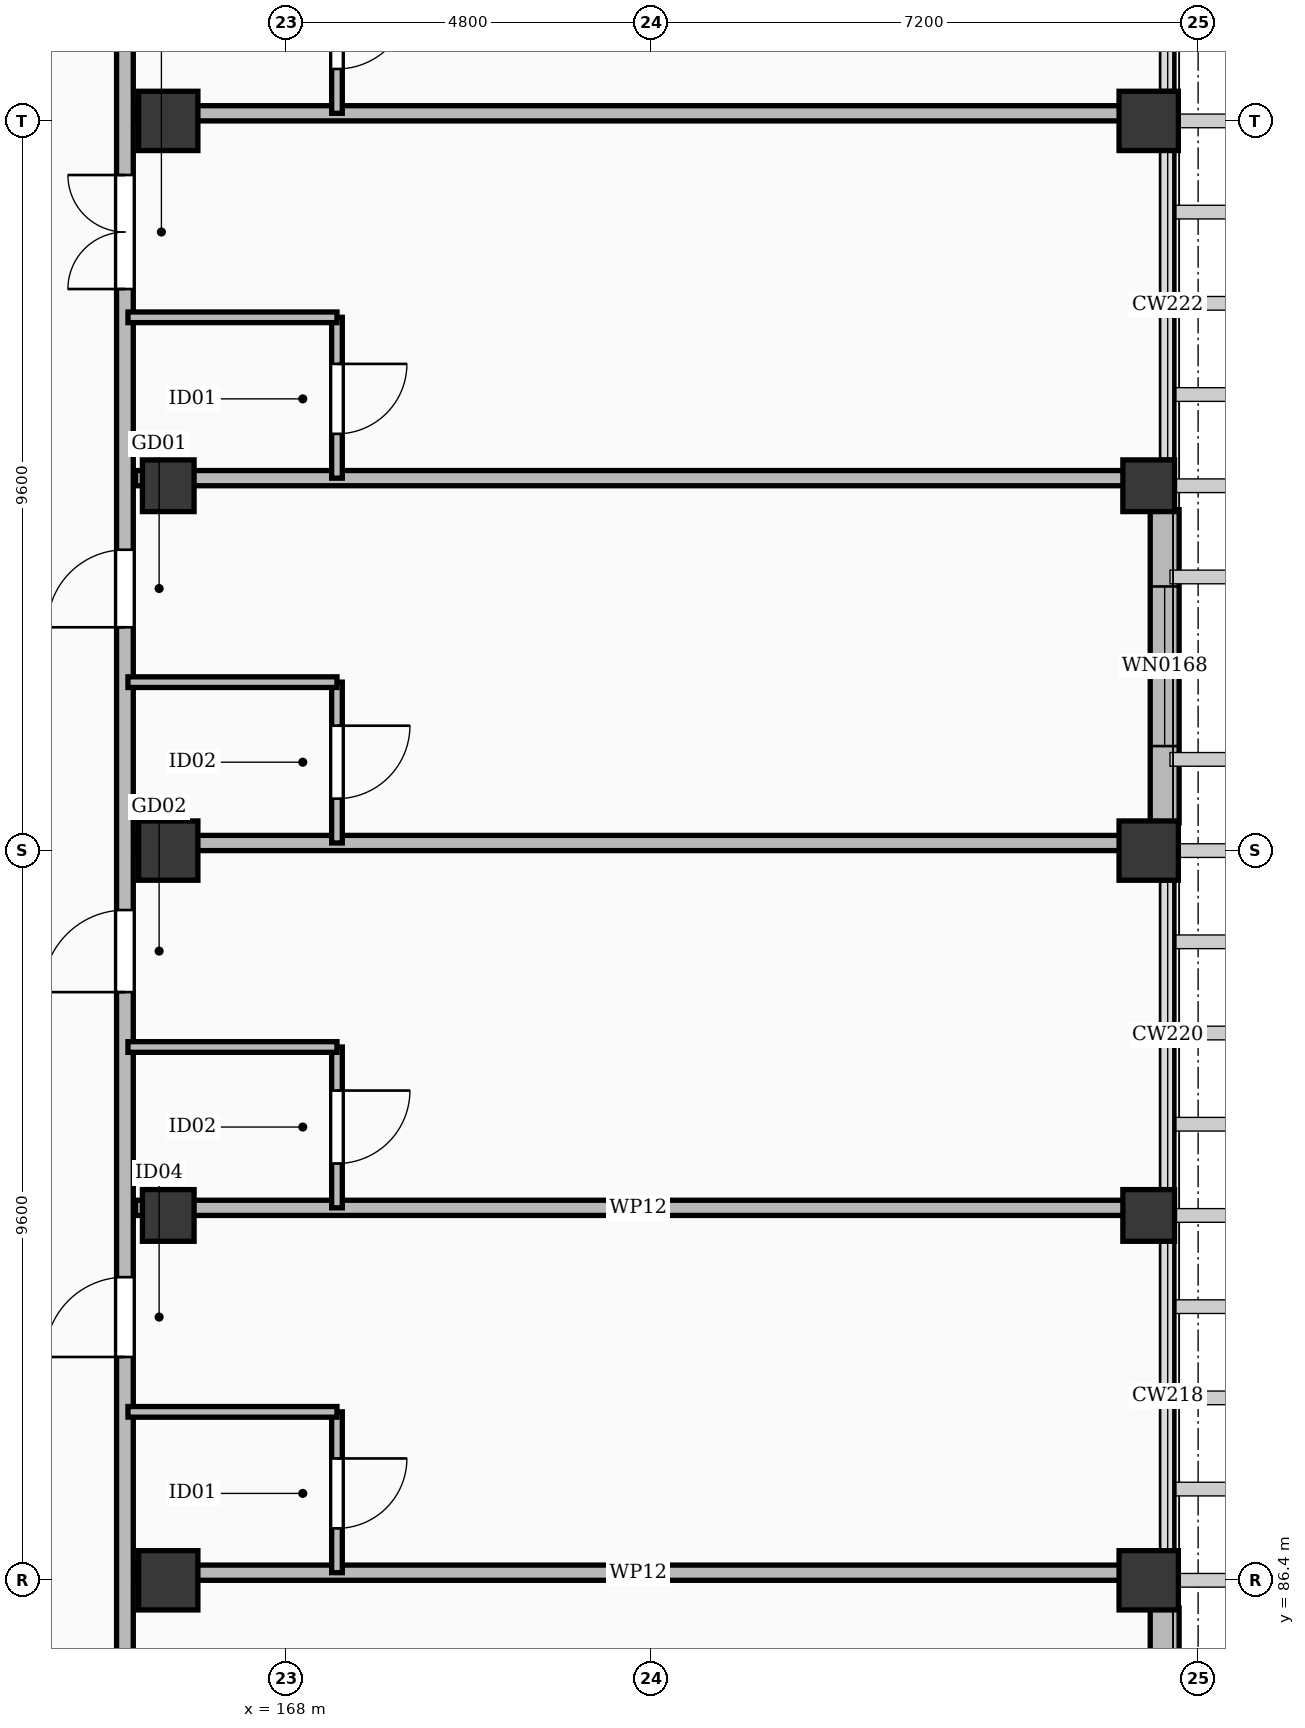
"""IFC4 building model, lengths in metres.
Left out: names, types, materials, properties, quantities, classifications, styles, units other than length and angle.
Written with IfcOpenShell. Run it as: python <this file> out.ifc"""

import sys

from ifc_helpers import new_model, si_unit, direction, frame, frame_2d, origin, origin_2d, place, context, subcontext, project, spatial, rectangle, extrude, element, fill, save


model = new_model("IFC4")
c1 = context("Model", 3, precision=1e-05, world=origin(), true_north=direction((0.0, 1.0)))
c2 = subcontext(c1, "Body", "Model", "MODEL_VIEW")
j1 = project(units=[si_unit("LENGTHUNIT", "METRE"), si_unit("PLANEANGLEUNIT", "RADIAN")], contexts=[c1])
p1 = place(None, origin())
s1 = spatial("IfcSite", under=j1, at=p1, CompositionType="ELEMENT")
p2 = place(p1, origin())
s2 = spatial("IfcBuilding", under=s1, at=p2, CompositionType="ELEMENT")
p3 = place(p2, frame((0.0, 0.0, 24.6)))
s3 = spatial("IfcBuildingStorey", under=s2, at=p3, CompositionType="ELEMENT", Elevation=24.6)
for number, where, z_axis, x_axis in (
    (1, (166.45, 86.4, 0.0), (0.0, 0.0, 1.0), (1.0, 0.0, 0.0)),
    (2, (166.45, 96.0, 0.0), (0.0, 0.0, 1.0), (1.0, 0.0, 0.0)),
    (3, (166.45, 105.6, 0.0), (0.0, 0.0, 1.0), (1.0, 0.0, 0.0)),
    (4, (179.35, 86.4, 0.0), (0.0, 0.0, 1.0), (1.0, 0.0, 0.0)),
    (5, (179.35, 96.0, 0.0), (0.0, 0.0, 1.0), (1.0, 0.0, 0.0)),
    (6, (179.35, 105.6, 0.0), (0.0, 0.0, 1.0), (1.0, 0.0, 0.0)),
):
    element("IfcColumn", number, at=place(p3, frame(where, z_axis=z_axis, x_axis=x_axis)), inside=s3, PredefinedType="COLUMN", context=c2, shape_type="SweptSolid", body=[
        extrude(rectangle(XDim=0.78, YDim=0.78, at=origin_2d()), origin(), (0.0, 0.0, 1.0), 3.6),
    ])
for number, where, z_axis, x_axis in (
    (7, (166.45, 91.2, 0.0), (0.0, 0.0, 1.0), (1.0, 0.0, 0.0)),
    (8, (166.45, 100.8, 0.0), (0.0, 0.0, 1.0), (1.0, 0.0, 0.0)),
    (9, (179.35, 91.2, 0.0), (0.0, 0.0, 1.0), (1.0, 0.0, 0.0)),
    (10, (179.35, 100.8, 0.0), (0.0, 0.0, 1.0), (1.0, 0.0, 0.0)),
):
    element("IfcColumn", number, at=place(p3, frame(where, z_axis=z_axis, x_axis=x_axis)), inside=s3, PredefinedType="COLUMN", context=c2, shape_type="SweptSolid", body=[
        extrude(rectangle(XDim=0.68, YDim=0.68, at=origin_2d()), origin(), (0.0, 0.0, 1.0), 3.6),
    ])
p4 = place(p3, frame((179.56, 86.035, 0.0), z_axis=(0.0, 0.0, 1.0), x_axis=(0.0, -1.0, 0.0)))
e11 = element("IfcWall", 11, at=p4, inside=s3, PredefinedType="SOLIDWALL", context=c2, shape_type="SweptSolid", body=[
    extrude(rectangle(XDim=4.12, YDim=0.38, at=frame_2d((2.06, 0.0))), origin(), (0.0, 0.0, 1.0), 2.582),
])
p5 = place(p4, frame((1.235, 0.0, 0.55)))
e12 = element("IfcOpeningElement", 12, at=p5, cuts=e11, PredefinedType="OPENING", context=c2, shape_type="SweptSolid", body=[
    extrude(rectangle(XDim=1.65, YDim=1.75, at=frame_2d((0.825, 0.875))), frame((0.0, 0.202, 0.0), z_axis=(0.0, -1.0, 0.0), x_axis=(1.0, 0.0, 0.0)), (0.0, 0.0, 1.0), 0.404),
])
p6 = place(p3, frame((179.56, 100.485, 0.0), z_axis=(0.0, 0.0, 1.0), x_axis=(0.0, -1.0, 0.0)))
e13 = element("IfcWall", 13, at=p6, inside=s3, PredefinedType="SOLIDWALL", context=c2, shape_type="SweptSolid", body=[
    extrude(rectangle(XDim=4.12, YDim=0.38, at=frame_2d((2.06, 0.0))), origin(), (0.0, 0.0, 1.0), 2.582),
])
p7 = place(p6, frame((1.01, 0.0, 0.55)))
e14 = element("IfcOpeningElement", 14, at=p7, cuts=e13, PredefinedType="OPENING", context=c2, shape_type="SweptSolid", body=[
    extrude(rectangle(XDim=2.1, YDim=1.78, at=frame_2d((1.05, 0.89))), frame((0.0, 0.202, 0.0), z_axis=(0.0, -1.0, 0.0), x_axis=(1.0, 0.0, 0.0)), (0.0, 0.0, 1.0), 0.404),
])
p8 = place(p3, frame((165.88, 65.4, 0.0), z_axis=(0.0, 0.0, 1.0), x_axis=(0.0, 1.0, 0.0)))
e15 = element("IfcWall", 15, at=p8, inside=s3, PredefinedType="PARTITIONING", context=c2, shape_type="SweptSolid", body=[
    extrude(rectangle(XDim=60.25, YDim=0.22, at=frame_2d((30.125, 0.0))), origin(), (0.0, 0.0, 1.0), 2.582),
])
p9 = place(p8, frame((4.738, 0.0, 0.0)))
e16 = element("IfcOpeningElement", 16, at=p9, cuts=e15, PredefinedType="OPENING", context=c2, shape_type="SweptSolid", body=[
    extrude(rectangle(XDim=1.02, YDim=2.2, at=frame_2d((0.51, 1.1))), frame((0.0, 0.122, 0.0), z_axis=(0.0, -1.0, 0.0), x_axis=(1.0, 0.0, 0.0)), (0.0, 0.0, 1.0), 0.244),
])
p10 = place(p8, frame((9.188, 0.0, 0.0)))
e17 = element("IfcOpeningElement", 17, at=p10, cuts=e15, PredefinedType="OPENING", context=c2, shape_type="SweptSolid", body=[
    extrude(rectangle(XDim=1.5, YDim=2.3, at=frame_2d((0.75, 1.15))), frame((0.0, 0.122, 0.0), z_axis=(0.0, -1.0, 0.0), x_axis=(1.0, 0.0, 0.0)), (0.0, 0.0, 1.0), 0.244),
])
p11 = place(p8, frame((14.338, 0.0, 0.0)))
e18 = element("IfcOpeningElement", 18, at=p11, cuts=e15, PredefinedType="OPENING", context=c2, shape_type="SweptSolid", body=[
    extrude(rectangle(XDim=1.12, YDim=2.15, at=frame_2d((0.56, 1.075))), frame((0.0, 0.122, 0.0), z_axis=(0.0, -1.0, 0.0), x_axis=(1.0, 0.0, 0.0)), (0.0, 0.0, 1.0), 0.244),
])
p12 = place(p8, frame((18.788, 0.0, 0.0)))
e19 = element("IfcOpeningElement", 19, at=p12, cuts=e15, PredefinedType="OPENING", context=c2, shape_type="SweptSolid", body=[
    extrude(rectangle(XDim=1.28, YDim=2.16, at=frame_2d((0.64, 1.08))), frame((0.0, 0.122, 0.0), z_axis=(0.0, -1.0, 0.0), x_axis=(1.0, 0.0, 0.0)), (0.0, 0.0, 1.0), 0.244),
])
p13 = place(p8, frame((23.938, 0.0, 0.0)))
e20 = element("IfcOpeningElement", 20, at=p13, cuts=e15, PredefinedType="OPENING", context=c2, shape_type="SweptSolid", body=[
    extrude(rectangle(XDim=1.05, YDim=2.18, at=frame_2d((0.525, 1.09))), frame((0.0, 0.122, 0.0), z_axis=(0.0, -1.0, 0.0), x_axis=(1.0, 0.0, 0.0)), (0.0, 0.0, 1.0), 0.244),
])
p14 = place(p8, frame((28.738, 0.0, 0.0)))
e21 = element("IfcOpeningElement", 21, at=p14, cuts=e15, PredefinedType="OPENING", context=c2, shape_type="SweptSolid", body=[
    extrude(rectangle(XDim=1.08, YDim=2.25, at=frame_2d((0.54, 1.125))), frame((0.0, 0.122, 0.0), z_axis=(0.0, -1.0, 0.0), x_axis=(1.0, 0.0, 0.0)), (0.0, 0.0, 1.0), 0.244),
])
p15 = place(p8, frame((33.538, 0.0, 0.0)))
e22 = element("IfcOpeningElement", 22, at=p15, cuts=e15, PredefinedType="OPENING", context=c2, shape_type="SweptSolid", body=[
    extrude(rectangle(XDim=1.02, YDim=2.2, at=frame_2d((0.51, 1.1))), frame((0.0, 0.122, 0.0), z_axis=(0.0, -1.0, 0.0), x_axis=(1.0, 0.0, 0.0)), (0.0, 0.0, 1.0), 0.244),
])
p16 = place(p8, frame((37.988, 0.0, 0.0)))
e23 = element("IfcOpeningElement", 23, at=p16, cuts=e15, PredefinedType="OPENING", context=c2, shape_type="SweptSolid", body=[
    extrude(rectangle(XDim=1.5, YDim=2.3, at=frame_2d((0.75, 1.15))), frame((0.0, 0.122, 0.0), z_axis=(0.0, -1.0, 0.0), x_axis=(1.0, 0.0, 0.0)), (0.0, 0.0, 1.0), 0.244),
])
p17 = place(p8, frame((43.138, 0.0, 0.0)))
e24 = element("IfcOpeningElement", 24, at=p17, cuts=e15, PredefinedType="OPENING", context=c2, shape_type="SweptSolid", body=[
    extrude(rectangle(XDim=1.12, YDim=2.15, at=frame_2d((0.56, 1.075))), frame((0.0, 0.122, 0.0), z_axis=(0.0, -1.0, 0.0), x_axis=(1.0, 0.0, 0.0)), (0.0, 0.0, 1.0), 0.244),
])
p18 = place(p8, frame((47.588, 0.0, 0.0)))
e25 = element("IfcOpeningElement", 25, at=p18, cuts=e15, PredefinedType="OPENING", context=c2, shape_type="SweptSolid", body=[
    extrude(rectangle(XDim=1.28, YDim=2.16, at=frame_2d((0.64, 1.08))), frame((0.0, 0.122, 0.0), z_axis=(0.0, -1.0, 0.0), x_axis=(1.0, 0.0, 0.0)), (0.0, 0.0, 1.0), 0.244),
])
p19 = place(p8, frame((52.738, 0.0, 0.0)))
e26 = element("IfcOpeningElement", 26, at=p19, cuts=e15, PredefinedType="OPENING", context=c2, shape_type="SweptSolid", body=[
    extrude(rectangle(XDim=1.05, YDim=2.18, at=frame_2d((0.525, 1.09))), frame((0.0, 0.122, 0.0), z_axis=(0.0, -1.0, 0.0), x_axis=(1.0, 0.0, 0.0)), (0.0, 0.0, 1.0), 0.244),
])
p20 = place(p8, frame((57.538, 0.0, 0.0)))
e27 = element("IfcOpeningElement", 27, at=p20, cuts=e15, PredefinedType="OPENING", context=c2, shape_type="SweptSolid", body=[
    extrude(rectangle(XDim=1.08, YDim=2.25, at=frame_2d((0.54, 1.125))), frame((0.0, 0.122, 0.0), z_axis=(0.0, -1.0, 0.0), x_axis=(1.0, 0.0, 0.0)), (0.0, 0.0, 1.0), 0.244),
])
p21 = place(p3, frame((166.02, 86.5, 0.0), z_axis=(0.0, 0.0, 1.0), x_axis=(1.0, 0.0, 0.0)))
e28 = element("IfcWall", 28, at=p21, inside=s3, PredefinedType="PARTITIONING", context=c2, shape_type="SweptSolid", body=[
    extrude(rectangle(XDim=13.23, YDim=0.2, at=frame_2d((6.615, 0.0))), origin(), (0.0, 0.0, 1.0), 2.582),
])
p22 = place(p3, frame((168.67, 86.5, 0.0), z_axis=(0.0, 0.0, 1.0), x_axis=(0.0, 1.0, 0.0)))
e29 = element("IfcWall", 29, at=p22, inside=s3, PredefinedType="PARTITIONING", context=c2, shape_type="SweptSolid", body=[
    extrude(rectangle(XDim=2.116, YDim=0.14, at=frame_2d((1.058, 0.0))), origin(), (0.0, 0.0, 1.0), 2.632),
])
p23 = place(p22, frame((0.583, 0.0, 0.0)))
e30 = element("IfcOpeningElement", 30, at=p23, cuts=e29, PredefinedType="OPENING", context=c2, shape_type="SweptSolid", body=[
    extrude(rectangle(XDim=0.92, YDim=2.1, at=frame_2d((0.46, 1.05))), frame((0.0, 0.082, 0.0), z_axis=(0.0, -1.0, 0.0), x_axis=(1.0, 0.0, 0.0)), (0.0, 0.0, 1.0), 0.164),
])
p24 = place(p3, frame((165.92, 88.616, 0.0), z_axis=(0.0, 0.0, 1.0), x_axis=(1.0, 0.0, 0.0)))
e31 = element("IfcWall", 31, at=p24, inside=s3, PredefinedType="PARTITIONING", context=c2, shape_type="SweptSolid", body=[
    extrude(rectangle(XDim=2.75, YDim=0.14, at=frame_2d((1.375, 0.0))), origin(), (0.0, 0.0, 1.0), 2.632),
])
p25 = place(p3, frame((166.02, 91.3, 0.0), z_axis=(0.0, 0.0, 1.0), x_axis=(1.0, 0.0, 0.0)))
e32 = element("IfcWall", 32, at=p25, inside=s3, PredefinedType="PARTITIONING", context=c2, shape_type="SweptSolid", body=[
    extrude(rectangle(XDim=13.23, YDim=0.2, at=frame_2d((6.615, 0.0))), origin(), (0.0, 0.0, 1.0), 2.582),
])
p26 = place(p3, frame((168.67, 91.3, 0.0), z_axis=(0.0, 0.0, 1.0), x_axis=(0.0, 1.0, 0.0)))
e33 = element("IfcWall", 33, at=p26, inside=s3, PredefinedType="PARTITIONING", context=c2, shape_type="SweptSolid", body=[
    extrude(rectangle(XDim=2.116, YDim=0.14, at=frame_2d((1.058, 0.0))), origin(), (0.0, 0.0, 1.0), 2.632),
])
p27 = place(p26, frame((0.583, 0.0, 0.0)))
e34 = element("IfcOpeningElement", 34, at=p27, cuts=e33, PredefinedType="OPENING", context=c2, shape_type="SweptSolid", body=[
    extrude(rectangle(XDim=0.96, YDim=2.12, at=frame_2d((0.48, 1.06))), frame((0.0, 0.082, 0.0), z_axis=(0.0, -1.0, 0.0), x_axis=(1.0, 0.0, 0.0)), (0.0, 0.0, 1.0), 0.164),
])
p28 = place(p3, frame((165.92, 93.416, 0.0), z_axis=(0.0, 0.0, 1.0), x_axis=(1.0, 0.0, 0.0)))
e35 = element("IfcWall", 35, at=p28, inside=s3, PredefinedType="PARTITIONING", context=c2, shape_type="SweptSolid", body=[
    extrude(rectangle(XDim=2.75, YDim=0.14, at=frame_2d((1.375, 0.0))), origin(), (0.0, 0.0, 1.0), 2.632),
])
p29 = place(p3, frame((166.02, 96.1, 0.0), z_axis=(0.0, 0.0, 1.0), x_axis=(1.0, 0.0, 0.0)))
e36 = element("IfcWall", 36, at=p29, inside=s3, PredefinedType="PARTITIONING", context=c2, shape_type="SweptSolid", body=[
    extrude(rectangle(XDim=13.23, YDim=0.2, at=frame_2d((6.615, 0.0))), origin(), (0.0, 0.0, 1.0), 2.582),
])
p30 = place(p3, frame((168.67, 96.1, 0.0), z_axis=(0.0, 0.0, 1.0), x_axis=(0.0, 1.0, 0.0)))
e37 = element("IfcWall", 37, at=p30, inside=s3, PredefinedType="PARTITIONING", context=c2, shape_type="SweptSolid", body=[
    extrude(rectangle(XDim=2.116, YDim=0.14, at=frame_2d((1.058, 0.0))), origin(), (0.0, 0.0, 1.0), 2.632),
])
p31 = place(p30, frame((0.583, 0.0, 0.0)))
e38 = element("IfcOpeningElement", 38, at=p31, cuts=e37, PredefinedType="OPENING", context=c2, shape_type="SweptSolid", body=[
    extrude(rectangle(XDim=0.96, YDim=2.12, at=frame_2d((0.48, 1.06))), frame((0.0, 0.082, 0.0), z_axis=(0.0, -1.0, 0.0), x_axis=(1.0, 0.0, 0.0)), (0.0, 0.0, 1.0), 0.164),
])
p32 = place(p3, frame((165.92, 98.216, 0.0), z_axis=(0.0, 0.0, 1.0), x_axis=(1.0, 0.0, 0.0)))
e39 = element("IfcWall", 39, at=p32, inside=s3, PredefinedType="PARTITIONING", context=c2, shape_type="SweptSolid", body=[
    extrude(rectangle(XDim=2.75, YDim=0.14, at=frame_2d((1.375, 0.0))), origin(), (0.0, 0.0, 1.0), 2.632),
])
p33 = place(p3, frame((166.02, 100.9, 0.0), z_axis=(0.0, 0.0, 1.0), x_axis=(1.0, 0.0, 0.0)))
e40 = element("IfcWall", 40, at=p33, inside=s3, PredefinedType="PARTITIONING", context=c2, shape_type="SweptSolid", body=[
    extrude(rectangle(XDim=13.23, YDim=0.2, at=frame_2d((6.615, 0.0))), origin(), (0.0, 0.0, 1.0), 2.582),
])
p34 = place(p3, frame((168.67, 100.9, 0.0), z_axis=(0.0, 0.0, 1.0), x_axis=(0.0, 1.0, 0.0)))
e41 = element("IfcWall", 41, at=p34, inside=s3, PredefinedType="PARTITIONING", context=c2, shape_type="SweptSolid", body=[
    extrude(rectangle(XDim=2.116, YDim=0.14, at=frame_2d((1.058, 0.0))), origin(), (0.0, 0.0, 1.0), 2.632),
])
p35 = place(p34, frame((0.583, 0.0, 0.0)))
e42 = element("IfcOpeningElement", 42, at=p35, cuts=e41, PredefinedType="OPENING", context=c2, shape_type="SweptSolid", body=[
    extrude(rectangle(XDim=0.92, YDim=2.1, at=frame_2d((0.46, 1.05))), frame((0.0, 0.082, 0.0), z_axis=(0.0, -1.0, 0.0), x_axis=(1.0, 0.0, 0.0)), (0.0, 0.0, 1.0), 0.164),
])
p36 = place(p3, frame((165.92, 103.016, 0.0), z_axis=(0.0, 0.0, 1.0), x_axis=(1.0, 0.0, 0.0)))
e43 = element("IfcWall", 43, at=p36, inside=s3, PredefinedType="PARTITIONING", context=c2, shape_type="SweptSolid", body=[
    extrude(rectangle(XDim=2.75, YDim=0.14, at=frame_2d((1.375, 0.0))), origin(), (0.0, 0.0, 1.0), 2.632),
])
p37 = place(p3, frame((166.02, 105.7, 0.0), z_axis=(0.0, 0.0, 1.0), x_axis=(1.0, 0.0, 0.0)))
e44 = element("IfcWall", 44, at=p37, inside=s3, PredefinedType="PARTITIONING", context=c2, shape_type="SweptSolid", body=[
    extrude(rectangle(XDim=13.23, YDim=0.2, at=frame_2d((6.615, 0.0))), origin(), (0.0, 0.0, 1.0), 2.582),
])
p38 = place(p3, frame((168.67, 105.7, 0.0), z_axis=(0.0, 0.0, 1.0), x_axis=(0.0, 1.0, 0.0)))
e45 = element("IfcWall", 45, at=p38, inside=s3, PredefinedType="PARTITIONING", context=c2, shape_type="SweptSolid", body=[
    extrude(rectangle(XDim=2.116, YDim=0.14, at=frame_2d((1.058, 0.0))), origin(), (0.0, 0.0, 1.0), 2.632),
])
p39 = place(p38, frame((0.583, 0.0, 0.0)))
e46 = element("IfcOpeningElement", 46, at=p39, cuts=e45, PredefinedType="OPENING", context=c2, shape_type="SweptSolid", body=[
    extrude(rectangle(XDim=0.96, YDim=2.12, at=frame_2d((0.48, 1.06))), frame((0.0, 0.082, 0.0), z_axis=(0.0, -1.0, 0.0), x_axis=(1.0, 0.0, 0.0)), (0.0, 0.0, 1.0), 0.164),
])
p40 = place(p7, origin())
e47 = element("IfcWindow", 47, at=p40, inside=s3, PartitioningType="SINGLE_PANEL", PredefinedType="WINDOW", context=c2, shape_type="SweptSolid", body=[
    extrude(rectangle(XDim=2.1, YDim=1.78, at=frame_2d((1.05, 0.89))), frame((0.0, 0.03, 0.0), z_axis=(0.0, -1.0, 0.0), x_axis=(1.0, 0.0, 0.0)), (0.0, 0.0, 1.0), 0.06),
])
fill(e14, e47)
p41 = place(p13, origin())
e48 = element("IfcDoor", 48, at=p41, inside=s3, OperationType="SINGLE_SWING_LEFT", PredefinedType="DOOR", context=c2, shape_type="SweptSolid", body=[
    extrude(rectangle(XDim=1.05, YDim=2.18, at=frame_2d((0.525, 1.09))), frame((0.0, 0.025, 0.0), z_axis=(0.0, -1.0, 0.0), x_axis=(1.0, 0.0, 0.0)), (0.0, 0.0, 1.0), 0.05),
])
fill(e20, e48)
p42 = place(p23, frame((0.92, 0.0, 0.0), z_axis=(0.0, 0.0, 1.0), x_axis=(-1.0, 0.0, 0.0)))
e49 = element("IfcDoor", 49, at=p42, inside=s3, OperationType="SINGLE_SWING_RIGHT", PredefinedType="DOOR", context=c2, shape_type="SweptSolid", body=[
    extrude(rectangle(XDim=0.92, YDim=2.1, at=frame_2d((0.46, 1.05))), frame((0.0, 0.025, 0.0), z_axis=(0.0, -1.0, 0.0), x_axis=(1.0, 0.0, 0.0)), (0.0, 0.0, 1.0), 0.05),
])
fill(e30, e49)
p43 = place(p14, origin())
e50 = element("IfcDoor", 50, at=p43, inside=s3, OperationType="SINGLE_SWING_LEFT", PredefinedType="DOOR", context=c2, shape_type="SweptSolid", body=[
    extrude(rectangle(XDim=1.08, YDim=2.25, at=frame_2d((0.54, 1.125))), frame((0.0, 0.025, 0.0), z_axis=(0.0, -1.0, 0.0), x_axis=(1.0, 0.0, 0.0)), (0.0, 0.0, 1.0), 0.05),
])
fill(e21, e50)
p44 = place(p27, frame((0.96, 0.0, 0.0), z_axis=(0.0, 0.0, 1.0), x_axis=(-1.0, 0.0, 0.0)))
e51 = element("IfcDoor", 51, at=p44, inside=s3, OperationType="SINGLE_SWING_RIGHT", PredefinedType="DOOR", context=c2, shape_type="SweptSolid", body=[
    extrude(rectangle(XDim=0.96, YDim=2.12, at=frame_2d((0.48, 1.06))), frame((0.0, 0.025, 0.0), z_axis=(0.0, -1.0, 0.0), x_axis=(1.0, 0.0, 0.0)), (0.0, 0.0, 1.0), 0.05),
])
fill(e34, e51)
p45 = place(p15, origin())
e52 = element("IfcDoor", 52, at=p45, inside=s3, OperationType="SINGLE_SWING_LEFT", PredefinedType="DOOR", context=c2, shape_type="SweptSolid", body=[
    extrude(rectangle(XDim=1.02, YDim=2.2, at=frame_2d((0.51, 1.1))), frame((0.0, 0.025, 0.0), z_axis=(0.0, -1.0, 0.0), x_axis=(1.0, 0.0, 0.0)), (0.0, 0.0, 1.0), 0.05),
])
fill(e22, e52)
p46 = place(p31, frame((0.96, 0.0, 0.0), z_axis=(0.0, 0.0, 1.0), x_axis=(-1.0, 0.0, 0.0)))
e53 = element("IfcDoor", 53, at=p46, inside=s3, OperationType="SINGLE_SWING_RIGHT", PredefinedType="DOOR", context=c2, shape_type="SweptSolid", body=[
    extrude(rectangle(XDim=0.96, YDim=2.12, at=frame_2d((0.48, 1.06))), frame((0.0, 0.025, 0.0), z_axis=(0.0, -1.0, 0.0), x_axis=(1.0, 0.0, 0.0)), (0.0, 0.0, 1.0), 0.05),
])
fill(e38, e53)
p47 = place(p16, origin())
e54 = element("IfcDoor", 54, at=p47, inside=s3, OperationType="DOUBLE_DOOR_SINGLE_SWING", PredefinedType="DOOR", context=c2, shape_type="SweptSolid", body=[
    extrude(rectangle(XDim=1.5, YDim=2.3, at=frame_2d((0.75, 1.15))), frame((0.0, 0.025, 0.0), z_axis=(0.0, -1.0, 0.0), x_axis=(1.0, 0.0, 0.0)), (0.0, 0.0, 1.0), 0.05),
])
fill(e23, e54)
p48 = place(p35, frame((0.92, 0.0, 0.0), z_axis=(0.0, 0.0, 1.0), x_axis=(-1.0, 0.0, 0.0)))
e55 = element("IfcDoor", 55, at=p48, inside=s3, OperationType="SINGLE_SWING_RIGHT", PredefinedType="DOOR", context=c2, shape_type="SweptSolid", body=[
    extrude(rectangle(XDim=0.92, YDim=2.1, at=frame_2d((0.46, 1.05))), frame((0.0, 0.025, 0.0), z_axis=(0.0, -1.0, 0.0), x_axis=(1.0, 0.0, 0.0)), (0.0, 0.0, 1.0), 0.05),
])
fill(e42, e55)
p49 = place(p39, frame((0.96, 0.0, 0.0), z_axis=(0.0, 0.0, 1.0), x_axis=(-1.0, 0.0, 0.0)))
e56 = element("IfcDoor", 56, at=p49, inside=s3, OperationType="SINGLE_SWING_RIGHT", PredefinedType="DOOR", context=c2, shape_type="SweptSolid", body=[
    extrude(rectangle(XDim=0.96, YDim=2.12, at=frame_2d((0.48, 1.06))), frame((0.0, 0.025, 0.0), z_axis=(0.0, -1.0, 0.0), x_axis=(1.0, 0.0, 0.0)), (0.0, 0.0, 1.0), 0.05),
])
fill(e46, e56)
save(model, sys.argv[1])
